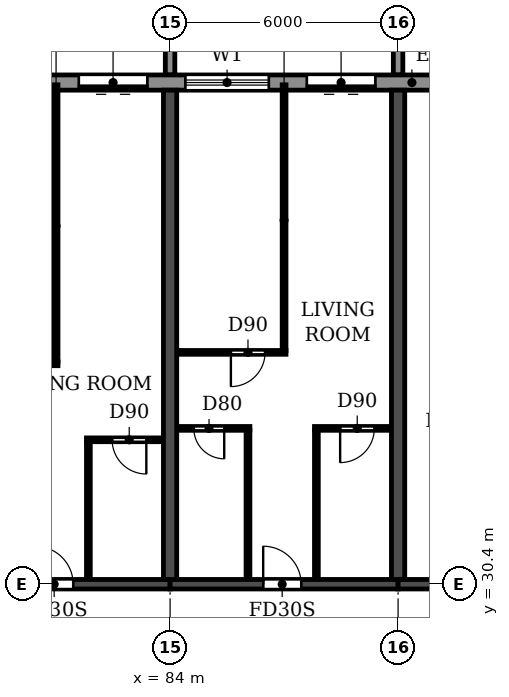
"""IFC4 building model, lengths in metres.
Left out: names, types, materials, properties, quantities, classifications, styles, units other than length and angle.
Written with IfcOpenShell. Run it as: python <this file> out.ifc"""

import sys

from ifc_helpers import new_model, si_unit, direction, frame, frame_2d, origin, place, context, subcontext, project, spatial, polyline, rectangle, outline, extrude, source, transform, mapped, element, fill, save


model = new_model("IFC4")
c1 = context("Model", 3, precision=1e-05, world=origin(), true_north=direction((0.0, 1.0)))
c2 = subcontext(c1, "Body", "Model", "MODEL_VIEW")
j1 = project(units=[si_unit("LENGTHUNIT", "METRE"), si_unit("PLANEANGLEUNIT", "RADIAN")], contexts=[c1])
p1 = place(None, origin())
s1 = spatial("IfcSite", under=j1, at=p1, CompositionType="ELEMENT")
p2 = place(p1, origin())
s2 = spatial("IfcBuilding", under=s1, at=p2, CompositionType="ELEMENT")
p3 = place(p2, frame((0.0, 0.0, 92.7)))
s3 = spatial("IfcBuildingStorey", under=s2, at=p3, CompositionType="ELEMENT", Elevation=92.7)
for number, where, z_axis, x_axis in (
    (1, (84.0, 30.525, 0.0), (0.0, 0.0, 1.0), (0.0, 1.0, 0.0)),
    (2, (90.0, 30.525, 0.0), (0.0, 0.0, 1.0), (0.0, 1.0, 0.0)),
):
    element("IfcWall", number, at=place(p3, frame(where, z_axis=z_axis, x_axis=x_axis)), inside=s3, PredefinedType="SHEAR", context=c2, shape_type="SweptSolid", body=[
        extrude(rectangle(XDim=12.875, YDim=0.35, at=frame_2d((6.438, 0.0))), origin(), (0.0, 0.0, 1.0), 3.06),
    ])
p4 = place(p3, frame((78.0, 30.4, 0.0), z_axis=(0.0, 0.0, 1.0), x_axis=(1.0, 0.0, 0.0)))
e3 = element("IfcWall", 3, at=p4, inside=s3, PredefinedType="SHEAR", context=c2, shape_type="SweptSolid", body=[
    extrude(rectangle(XDim=6.0, YDim=0.25, at=frame_2d((3.0, 0.0))), origin(), (0.0, 0.0, 1.0), 2.46),
])
p5 = place(p4, frame((2.45, 0.0, 0.0)))
e4 = element("IfcOpeningElement", 4, at=p5, cuts=e3, PredefinedType="OPENING", context=c2, shape_type="SweptSolid", body=[
    extrude(rectangle(XDim=1.0, YDim=2.1, at=frame_2d((0.5, 1.05))), frame((0.0, 0.135, 0.0), z_axis=(0.0, -1.0, 0.0), x_axis=(1.0, 0.0, 0.0)), (0.0, 0.0, 1.0), 0.27),
])
p6 = place(p3, frame((84.0, 30.4, 0.0), z_axis=(0.0, 0.0, 1.0), x_axis=(1.0, 0.0, 0.0)))
e5 = element("IfcWall", 5, at=p6, inside=s3, PredefinedType="SHEAR", context=c2, shape_type="SweptSolid", body=[
    extrude(rectangle(XDim=6.0, YDim=0.25, at=frame_2d((3.0, 0.0))), origin(), (0.0, 0.0, 1.0), 2.46),
])
p7 = place(p6, frame((2.45, 0.0, 0.0)))
e6 = element("IfcOpeningElement", 6, at=p7, cuts=e5, PredefinedType="OPENING", context=c2, shape_type="SweptSolid", body=[
    extrude(rectangle(XDim=1.0, YDim=2.1, at=frame_2d((0.5, 1.05))), frame((0.0, 0.135, 0.0), z_axis=(0.0, -1.0, 0.0), x_axis=(1.0, 0.0, 0.0)), (0.0, 0.0, 1.0), 0.27),
])
p8 = place(p3, frame((90.0, 30.4, 0.0), z_axis=(0.0, 0.0, 1.0), x_axis=(1.0, 0.0, 0.0)))
e7 = element("IfcWall", 7, at=p8, inside=s3, PredefinedType="SHEAR", context=c2, shape_type="SweptSolid", body=[
    extrude(rectangle(XDim=5.8, YDim=0.25, at=frame_2d((2.9, 0.0))), origin(), (0.0, 0.0, 1.0), 2.46),
])
p9 = place(p8, frame((2.5, 0.0, 0.0)))
e8 = element("IfcOpeningElement", 8, at=p9, cuts=e7, PredefinedType="OPENING", context=c2, shape_type="SweptSolid", body=[
    extrude(rectangle(XDim=1.0, YDim=2.1, at=frame_2d((0.5, 1.05))), frame((0.0, 0.135, 0.0), z_axis=(0.0, -1.0, 0.0), x_axis=(1.0, 0.0, 0.0)), (0.0, 0.0, 1.0), 0.27),
])
p10 = place(p3, frame((91.317, 43.6, 0.0), z_axis=(0.0, 0.0, 1.0), x_axis=(-1.0, 0.0, 0.0)))
e9 = element("IfcWall", 9, at=p10, inside=s3, PredefinedType="STANDARD", context=c2, shape_type="SweptSolid", body=[
    extrude(rectangle(XDim=80.634, YDim=0.4, at=frame_2d((40.317, 0.0))), origin(), (0.0, 0.0, 1.0), 3.06),
])
p11 = place(p10, frame((76.717, 0.0, 0.9)))
e10 = element("IfcOpeningElement", 10, at=p11, cuts=e9, PredefinedType="OPENING", context=c2, shape_type="SweptSolid", body=[
    extrude(rectangle(XDim=2.2, YDim=1.5, at=frame_2d((1.1, 0.75))), frame((0.0, 0.21, 0.0), z_axis=(0.0, -1.0, 0.0), x_axis=(1.0, 0.0, 0.0)), (0.0, 0.0, 1.0), 0.42),
])
p12 = place(p10, frame((73.917, 0.0, 0.0)))
e11 = element("IfcOpeningElement", 11, at=p12, cuts=e9, PredefinedType="OPENING", context=c2, shape_type="SweptSolid", body=[
    extrude(rectangle(XDim=1.8, YDim=2.4, at=frame_2d((0.9, 1.2))), frame((0.0, 0.21, 0.0), z_axis=(0.0, -1.0, 0.0), x_axis=(1.0, 0.0, 0.0)), (0.0, 0.0, 1.0), 0.42),
])
p13 = place(p10, frame((70.717, 0.0, 0.9)))
e12 = element("IfcOpeningElement", 12, at=p13, cuts=e9, PredefinedType="OPENING", context=c2, shape_type="SweptSolid", body=[
    extrude(rectangle(XDim=2.2, YDim=1.5, at=frame_2d((1.1, 0.75))), frame((0.0, 0.21, 0.0), z_axis=(0.0, -1.0, 0.0), x_axis=(1.0, 0.0, 0.0)), (0.0, 0.0, 1.0), 0.42),
])
p14 = place(p10, frame((67.717, 0.0, 0.9)))
e13 = element("IfcOpeningElement", 13, at=p14, cuts=e9, PredefinedType="OPENING", context=c2, shape_type="SweptSolid", body=[
    extrude(rectangle(XDim=2.2, YDim=1.5, at=frame_2d((1.1, 0.75))), frame((0.0, 0.21, 0.0), z_axis=(0.0, -1.0, 0.0), x_axis=(1.0, 0.0, 0.0)), (0.0, 0.0, 1.0), 0.42),
])
p15 = place(p10, frame((64.717, 0.0, 0.9)))
e14 = element("IfcOpeningElement", 14, at=p15, cuts=e9, PredefinedType="OPENING", context=c2, shape_type="SweptSolid", body=[
    extrude(rectangle(XDim=2.2, YDim=1.5, at=frame_2d((1.1, 0.75))), frame((0.0, 0.21, 0.0), z_axis=(0.0, -1.0, 0.0), x_axis=(1.0, 0.0, 0.0)), (0.0, 0.0, 1.0), 0.42),
])
p16 = place(p10, frame((61.917, 0.0, 0.0)))
e15 = element("IfcOpeningElement", 15, at=p16, cuts=e9, PredefinedType="OPENING", context=c2, shape_type="SweptSolid", body=[
    extrude(rectangle(XDim=1.8, YDim=2.4, at=frame_2d((0.9, 1.2))), frame((0.0, 0.21, 0.0), z_axis=(0.0, -1.0, 0.0), x_axis=(1.0, 0.0, 0.0)), (0.0, 0.0, 1.0), 0.42),
])
p17 = place(p10, frame((58.717, 0.0, 0.9)))
e16 = element("IfcOpeningElement", 16, at=p17, cuts=e9, PredefinedType="OPENING", context=c2, shape_type="SweptSolid", body=[
    extrude(rectangle(XDim=2.2, YDim=1.5, at=frame_2d((1.1, 0.75))), frame((0.0, 0.21, 0.0), z_axis=(0.0, -1.0, 0.0), x_axis=(1.0, 0.0, 0.0)), (0.0, 0.0, 1.0), 0.42),
])
p18 = place(p10, frame((55.717, 0.0, 0.9)))
e17 = element("IfcOpeningElement", 17, at=p18, cuts=e9, PredefinedType="OPENING", context=c2, shape_type="SweptSolid", body=[
    extrude(rectangle(XDim=2.2, YDim=1.5, at=frame_2d((1.1, 0.75))), frame((0.0, 0.21, 0.0), z_axis=(0.0, -1.0, 0.0), x_axis=(1.0, 0.0, 0.0)), (0.0, 0.0, 1.0), 0.42),
])
p19 = place(p10, frame((52.917, 0.0, 0.0)))
e18 = element("IfcOpeningElement", 18, at=p19, cuts=e9, PredefinedType="OPENING", context=c2, shape_type="SweptSolid", body=[
    extrude(rectangle(XDim=1.8, YDim=2.4, at=frame_2d((0.9, 1.2))), frame((0.0, 0.21, 0.0), z_axis=(0.0, -1.0, 0.0), x_axis=(1.0, 0.0, 0.0)), (0.0, 0.0, 1.0), 0.42),
])
p20 = place(p10, frame((49.717, 0.0, 0.9)))
e19 = element("IfcOpeningElement", 19, at=p20, cuts=e9, PredefinedType="OPENING", context=c2, shape_type="SweptSolid", body=[
    extrude(rectangle(XDim=2.2, YDim=1.5, at=frame_2d((1.1, 0.75))), frame((0.0, 0.21, 0.0), z_axis=(0.0, -1.0, 0.0), x_axis=(1.0, 0.0, 0.0)), (0.0, 0.0, 1.0), 0.42),
])
p21 = place(p10, frame((46.717, 0.0, 0.9)))
e20 = element("IfcOpeningElement", 20, at=p21, cuts=e9, PredefinedType="OPENING", context=c2, shape_type="SweptSolid", body=[
    extrude(rectangle(XDim=2.2, YDim=1.5, at=frame_2d((1.1, 0.75))), frame((0.0, 0.21, 0.0), z_axis=(0.0, -1.0, 0.0), x_axis=(1.0, 0.0, 0.0)), (0.0, 0.0, 1.0), 0.42),
])
p22 = place(p10, frame((43.717, 0.0, 0.9)))
e21 = element("IfcOpeningElement", 21, at=p22, cuts=e9, PredefinedType="OPENING", context=c2, shape_type="SweptSolid", body=[
    extrude(rectangle(XDim=2.2, YDim=1.5, at=frame_2d((1.1, 0.75))), frame((0.0, 0.21, 0.0), z_axis=(0.0, -1.0, 0.0), x_axis=(1.0, 0.0, 0.0)), (0.0, 0.0, 1.0), 0.42),
])
p23 = place(p10, frame((40.717, 0.0, 0.9)))
e22 = element("IfcOpeningElement", 22, at=p23, cuts=e9, PredefinedType="OPENING", context=c2, shape_type="SweptSolid", body=[
    extrude(rectangle(XDim=2.2, YDim=1.5, at=frame_2d((1.1, 0.75))), frame((0.0, 0.21, 0.0), z_axis=(0.0, -1.0, 0.0), x_axis=(1.0, 0.0, 0.0)), (0.0, 0.0, 1.0), 0.42),
])
p24 = place(p10, frame((37.917, 0.0, 0.0)))
e23 = element("IfcOpeningElement", 23, at=p24, cuts=e9, PredefinedType="OPENING", context=c2, shape_type="SweptSolid", body=[
    extrude(rectangle(XDim=1.8, YDim=2.4, at=frame_2d((0.9, 1.2))), frame((0.0, 0.21, 0.0), z_axis=(0.0, -1.0, 0.0), x_axis=(1.0, 0.0, 0.0)), (0.0, 0.0, 1.0), 0.42),
])
p25 = place(p10, frame((34.917, 0.0, 0.0)))
e24 = element("IfcOpeningElement", 24, at=p25, cuts=e9, PredefinedType="OPENING", context=c2, shape_type="SweptSolid", body=[
    extrude(rectangle(XDim=1.8, YDim=2.4, at=frame_2d((0.9, 1.2))), frame((0.0, 0.21, 0.0), z_axis=(0.0, -1.0, 0.0), x_axis=(1.0, 0.0, 0.0)), (0.0, 0.0, 1.0), 0.42),
])
p26 = place(p10, frame((31.717, 0.0, 0.9)))
e25 = element("IfcOpeningElement", 25, at=p26, cuts=e9, PredefinedType="OPENING", context=c2, shape_type="SweptSolid", body=[
    extrude(rectangle(XDim=2.2, YDim=1.5, at=frame_2d((1.1, 0.75))), frame((0.0, 0.21, 0.0), z_axis=(0.0, -1.0, 0.0), x_axis=(1.0, 0.0, 0.0)), (0.0, 0.0, 1.0), 0.42),
])
p27 = place(p10, frame((28.717, 0.0, 0.9)))
e26 = element("IfcOpeningElement", 26, at=p27, cuts=e9, PredefinedType="OPENING", context=c2, shape_type="SweptSolid", body=[
    extrude(rectangle(XDim=2.2, YDim=1.5, at=frame_2d((1.1, 0.75))), frame((0.0, 0.21, 0.0), z_axis=(0.0, -1.0, 0.0), x_axis=(1.0, 0.0, 0.0)), (0.0, 0.0, 1.0), 0.42),
])
p28 = place(p10, frame((25.717, 0.0, 0.9)))
e27 = element("IfcOpeningElement", 27, at=p28, cuts=e9, PredefinedType="OPENING", context=c2, shape_type="SweptSolid", body=[
    extrude(rectangle(XDim=2.2, YDim=1.5, at=frame_2d((1.1, 0.75))), frame((0.0, 0.21, 0.0), z_axis=(0.0, -1.0, 0.0), x_axis=(1.0, 0.0, 0.0)), (0.0, 0.0, 1.0), 0.42),
])
p29 = place(p10, frame((22.717, 0.0, 0.9)))
e28 = element("IfcOpeningElement", 28, at=p29, cuts=e9, PredefinedType="OPENING", context=c2, shape_type="SweptSolid", body=[
    extrude(rectangle(XDim=2.2, YDim=1.5, at=frame_2d((1.1, 0.75))), frame((0.0, 0.21, 0.0), z_axis=(0.0, -1.0, 0.0), x_axis=(1.0, 0.0, 0.0)), (0.0, 0.0, 1.0), 0.42),
])
p30 = place(p10, frame((19.917, 0.0, 0.0)))
e29 = element("IfcOpeningElement", 29, at=p30, cuts=e9, PredefinedType="OPENING", context=c2, shape_type="SweptSolid", body=[
    extrude(rectangle(XDim=1.8, YDim=2.4, at=frame_2d((0.9, 1.2))), frame((0.0, 0.21, 0.0), z_axis=(0.0, -1.0, 0.0), x_axis=(1.0, 0.0, 0.0)), (0.0, 0.0, 1.0), 0.42),
])
p31 = place(p10, frame((16.717, 0.0, 0.9)))
e30 = element("IfcOpeningElement", 30, at=p31, cuts=e9, PredefinedType="OPENING", context=c2, shape_type="SweptSolid", body=[
    extrude(rectangle(XDim=2.2, YDim=1.5, at=frame_2d((1.1, 0.75))), frame((0.0, 0.21, 0.0), z_axis=(0.0, -1.0, 0.0), x_axis=(1.0, 0.0, 0.0)), (0.0, 0.0, 1.0), 0.42),
])
p32 = place(p10, frame((13.917, 0.0, 0.0)))
e31 = element("IfcOpeningElement", 31, at=p32, cuts=e9, PredefinedType="OPENING", context=c2, shape_type="SweptSolid", body=[
    extrude(rectangle(XDim=1.8, YDim=2.4, at=frame_2d((0.9, 1.2))), frame((0.0, 0.21, 0.0), z_axis=(0.0, -1.0, 0.0), x_axis=(1.0, 0.0, 0.0)), (0.0, 0.0, 1.0), 0.42),
])
p33 = place(p10, frame((10.717, 0.0, 0.9)))
e32 = element("IfcOpeningElement", 32, at=p33, cuts=e9, PredefinedType="OPENING", context=c2, shape_type="SweptSolid", body=[
    extrude(rectangle(XDim=2.2, YDim=1.5, at=frame_2d((1.1, 0.75))), frame((0.0, 0.21, 0.0), z_axis=(0.0, -1.0, 0.0), x_axis=(1.0, 0.0, 0.0)), (0.0, 0.0, 1.0), 0.42),
])
p34 = place(p10, frame((7.917, 0.0, 0.0)))
e33 = element("IfcOpeningElement", 33, at=p34, cuts=e9, PredefinedType="OPENING", context=c2, shape_type="SweptSolid", body=[
    extrude(rectangle(XDim=1.8, YDim=2.4, at=frame_2d((0.9, 1.2))), frame((0.0, 0.21, 0.0), z_axis=(0.0, -1.0, 0.0), x_axis=(1.0, 0.0, 0.0)), (0.0, 0.0, 1.0), 0.42),
])
p35 = place(p10, frame((4.717, 0.0, 0.9)))
e34 = element("IfcOpeningElement", 34, at=p35, cuts=e9, PredefinedType="OPENING", context=c2, shape_type="SweptSolid", body=[
    extrude(rectangle(XDim=2.2, YDim=1.5, at=frame_2d((1.1, 0.75))), frame((0.0, 0.21, 0.0), z_axis=(0.0, -1.0, 0.0), x_axis=(1.0, 0.0, 0.0)), (0.0, 0.0, 1.0), 0.42),
])
p36 = place(p10, frame((1.917, 0.0, 0.0)))
e35 = element("IfcOpeningElement", 35, at=p36, cuts=e9, PredefinedType="OPENING", context=c2, shape_type="SweptSolid", body=[
    extrude(rectangle(XDim=1.8, YDim=2.4, at=frame_2d((0.9, 1.2))), frame((0.0, 0.21, 0.0), z_axis=(0.0, -1.0, 0.0), x_axis=(1.0, 0.0, 0.0)), (0.0, 0.0, 1.0), 0.42),
])
m1 = source(origin(), c2, "Body", "SweptSolid", [
    extrude(outline(polyline([(0.0, 0.0), (0.25, 0.0), (0.25, 3.1), (0.0, 3.1), (0.0, 0.0)])), origin(), (0.0, 0.0, 1.0), 3.1),
])
for number, where in (
    (36, (83.875, 43.8, 0.0)),
    (37, (89.875, 43.8, 0.0)),
):
    element("IfcWall", number, at=place(p3, frame(where)), inside=s3, PredefinedType="STANDARD", context=c2, shape_type="MappedRepresentation", body=[
        mapped(m1, transform((0.0, 0.0, 0.0))),
    ])
p37 = place(p3, frame((81.8, 34.2, 0.0), z_axis=(0.0, 0.0, 1.0), x_axis=(1.0, 0.0, 0.0)))
e38 = element("IfcWall", 38, at=p37, inside=s3, PredefinedType="PARTITIONING", context=c2, shape_type="SweptSolid", body=[
    extrude(rectangle(XDim=2.015, YDim=0.1, at=frame_2d((1.007, 0.0))), origin(), (0.0, 0.0, 1.0), 3.06),
])
p38 = place(p37, frame((0.675, 0.0, 0.0)))
e39 = element("IfcOpeningElement", 39, at=p38, cuts=e38, PredefinedType="OPENING", context=c2, shape_type="SweptSolid", body=[
    extrude(rectangle(XDim=0.9, YDim=2.1, at=frame_2d((0.45, 1.05))), frame((0.0, 0.06, 0.0), z_axis=(0.0, -1.0, 0.0), x_axis=(1.0, 0.0, 0.0)), (0.0, 0.0, 1.0), 0.12),
])
p39 = place(p3, frame((84.185, 34.5, 0.0), z_axis=(0.0, 0.0, 1.0), x_axis=(1.0, 0.0, 0.0)))
e40 = element("IfcWall", 40, at=p39, inside=s3, PredefinedType="PARTITIONING", context=c2, shape_type="SweptSolid", body=[
    extrude(rectangle(XDim=1.915, YDim=0.1, at=frame_2d((0.958, 0.0))), origin(), (0.0, 0.0, 1.0), 3.06),
])
p40 = place(p39, frame((0.44, 0.0, 0.0)))
e41 = element("IfcOpeningElement", 41, at=p40, cuts=e40, PredefinedType="OPENING", context=c2, shape_type="SweptSolid", body=[
    extrude(rectangle(XDim=0.8, YDim=2.1, at=frame_2d((0.4, 1.05))), frame((0.0, 0.06, 0.0), z_axis=(0.0, -1.0, 0.0), x_axis=(1.0, 0.0, 0.0)), (0.0, 0.0, 1.0), 0.12),
])
p41 = place(p3, frame((87.8, 34.5, 0.0), z_axis=(0.0, 0.0, 1.0), x_axis=(1.0, 0.0, 0.0)))
e42 = element("IfcWall", 42, at=p41, inside=s3, PredefinedType="PARTITIONING", context=c2, shape_type="SweptSolid", body=[
    extrude(rectangle(XDim=2.015, YDim=0.1, at=frame_2d((1.007, 0.0))), origin(), (0.0, 0.0, 1.0), 3.06),
])
p42 = place(p41, frame((0.675, 0.0, 0.0)))
e43 = element("IfcOpeningElement", 43, at=p42, cuts=e42, PredefinedType="OPENING", context=c2, shape_type="SweptSolid", body=[
    extrude(rectangle(XDim=0.9, YDim=2.1, at=frame_2d((0.45, 1.05))), frame((0.0, 0.06, 0.0), z_axis=(0.0, -1.0, 0.0), x_axis=(1.0, 0.0, 0.0)), (0.0, 0.0, 1.0), 0.12),
])
p43 = place(p3, frame((78.185, 36.2, 0.0), z_axis=(0.0, 0.0, 1.0), x_axis=(1.0, 0.0, 0.0)))
e44 = element("IfcWall", 44, at=p43, inside=s3, PredefinedType="PARTITIONING", context=c2, shape_type="SweptSolid", body=[
    extrude(rectangle(XDim=2.865, YDim=0.1, at=frame_2d((1.433, 0.0))), origin(), (0.0, 0.0, 1.0), 3.06),
])
p44 = place(p43, frame((0.315, 0.0, 0.0)))
e45 = element("IfcOpeningElement", 45, at=p44, cuts=e44, PredefinedType="OPENING", context=c2, shape_type="SweptSolid", body=[
    extrude(rectangle(XDim=0.9, YDim=2.1, at=frame_2d((0.45, 1.05))), frame((0.0, 0.06, 0.0), z_axis=(0.0, -1.0, 0.0), x_axis=(1.0, 0.0, 0.0)), (0.0, 0.0, 1.0), 0.12),
])
p45 = place(p3, frame((84.185, 36.5, 0.0), z_axis=(0.0, 0.0, 1.0), x_axis=(1.0, 0.0, 0.0)))
e46 = element("IfcWall", 46, at=p45, inside=s3, PredefinedType="PARTITIONING", context=c2, shape_type="SweptSolid", body=[
    extrude(rectangle(XDim=2.865, YDim=0.1, at=frame_2d((1.433, 0.0))), origin(), (0.0, 0.0, 1.0), 3.06),
])
p46 = place(p45, frame((1.415, 0.0, 0.0)))
e47 = element("IfcOpeningElement", 47, at=p46, cuts=e46, PredefinedType="OPENING", context=c2, shape_type="SweptSolid", body=[
    extrude(rectangle(XDim=0.9, YDim=2.1, at=frame_2d((0.45, 1.05))), frame((0.0, 0.06, 0.0), z_axis=(0.0, -1.0, 0.0), x_axis=(1.0, 0.0, 0.0)), (0.0, 0.0, 1.0), 0.12),
])
p47 = place(p3, frame((81.0, 36.25, 0.0), z_axis=(0.0, 0.0, 1.0), x_axis=(0.0, 1.0, 0.0)))
e48 = element("IfcWall", 48, at=p47, inside=s3, PredefinedType="PARTITIONING", context=c2, shape_type="SweptSolid", body=[
    extrude(rectangle(XDim=7.29, YDim=0.1, at=frame_2d((3.645, 0.0))), origin(), (0.0, 0.0, 1.0), 3.06),
])
p48 = place(p3, frame((81.85, 30.535, 0.0), z_axis=(0.0, 0.0, 1.0), x_axis=(0.0, 1.0, 0.0)))
e49 = element("IfcWall", 49, at=p48, inside=s3, PredefinedType="PARTITIONING", context=c2, shape_type="SweptSolid", body=[
    extrude(rectangle(XDim=3.615, YDim=0.1, at=frame_2d((1.808, 0.0))), origin(), (0.0, 0.0, 1.0), 3.06),
])
p49 = place(p3, frame((86.05, 30.535, 0.0), z_axis=(0.0, 0.0, 1.0), x_axis=(0.0, 1.0, 0.0)))
e50 = element("IfcWall", 50, at=p49, inside=s3, PredefinedType="PARTITIONING", context=c2, shape_type="SweptSolid", body=[
    extrude(rectangle(XDim=3.915, YDim=0.1, at=frame_2d((1.958, 0.0))), origin(), (0.0, 0.0, 1.0), 3.06),
])
p50 = place(p3, frame((87.0, 36.55, 0.0), z_axis=(0.0, 0.0, 1.0), x_axis=(0.0, 1.0, 0.0)))
e51 = element("IfcWall", 51, at=p50, inside=s3, PredefinedType="PARTITIONING", context=c2, shape_type="SweptSolid", body=[
    extrude(rectangle(XDim=6.99, YDim=0.1, at=frame_2d((3.495, 0.0))), origin(), (0.0, 0.0, 1.0), 3.06),
])
p51 = place(p3, frame((87.85, 30.535, 0.0), z_axis=(0.0, 0.0, 1.0), x_axis=(0.0, 1.0, 0.0)))
e52 = element("IfcWall", 52, at=p51, inside=s3, PredefinedType="PARTITIONING", context=c2, shape_type="SweptSolid", body=[
    extrude(rectangle(XDim=3.915, YDim=0.1, at=frame_2d((1.958, 0.0))), origin(), (0.0, 0.0, 1.0), 3.06),
])
p52 = place(p34, origin())
e53 = element("IfcDoor", 53, at=p52, inside=s3, OperationType="DOUBLE_DOOR_SLIDING", PredefinedType="DOOR", context=c2, shape_type="SweptSolid", body=[
    extrude(rectangle(XDim=1.8, YDim=2.4, at=frame_2d((0.9, 1.2))), frame((0.0, 0.025, 0.0), z_axis=(0.0, -1.0, 0.0), x_axis=(1.0, 0.0, 0.0)), (0.0, 0.0, 1.0), 0.05),
])
fill(e33, e53)
p53 = place(p35, origin())
e54 = element("IfcWindow", 54, at=p53, inside=s3, PartitioningType="DOUBLE_PANEL_HORIZONTAL", PredefinedType="WINDOW", context=c2, shape_type="SweptSolid", body=[
    extrude(rectangle(XDim=2.2, YDim=1.5, at=frame_2d((1.1, 0.75))), frame((0.0, 0.03, 0.0), z_axis=(0.0, -1.0, 0.0), x_axis=(1.0, 0.0, 0.0)), (0.0, 0.0, 1.0), 0.06),
])
fill(e34, e54)
p54 = place(p36, origin())
e55 = element("IfcDoor", 55, at=p54, inside=s3, OperationType="DOUBLE_DOOR_SLIDING", PredefinedType="DOOR", context=c2, shape_type="SweptSolid", body=[
    extrude(rectangle(XDim=1.8, YDim=2.4, at=frame_2d((0.9, 1.2))), frame((0.0, 0.025, 0.0), z_axis=(0.0, -1.0, 0.0), x_axis=(1.0, 0.0, 0.0)), (0.0, 0.0, 1.0), 0.05),
])
fill(e35, e55)
p55 = place(p5, origin())
e56 = element("IfcDoor", 56, at=p55, inside=s3, OperationType="SINGLE_SWING_LEFT", PredefinedType="DOOR", context=c2, shape_type="SweptSolid", body=[
    extrude(rectangle(XDim=1.0, YDim=2.1, at=frame_2d((0.5, 1.05))), frame((0.0, 0.025, 0.0), z_axis=(0.0, -1.0, 0.0), x_axis=(1.0, 0.0, 0.0)), (0.0, 0.0, 1.0), 0.05),
])
fill(e4, e56)
p56 = place(p38, frame((0.9, 0.0, 0.0), z_axis=(0.0, 0.0, 1.0), x_axis=(-1.0, 0.0, 0.0)))
e57 = element("IfcDoor", 57, at=p56, inside=s3, OperationType="SINGLE_SWING_LEFT", PredefinedType="DOOR", context=c2, shape_type="SweptSolid", body=[
    extrude(rectangle(XDim=0.9, YDim=2.1, at=frame_2d((0.45, 1.05))), frame((0.0, 0.025, 0.0), z_axis=(0.0, -1.0, 0.0), x_axis=(1.0, 0.0, 0.0)), (0.0, 0.0, 1.0), 0.05),
])
fill(e39, e57)
p57 = place(p40, frame((0.8, 0.0, 0.0), z_axis=(0.0, 0.0, 1.0), x_axis=(-1.0, 0.0, 0.0)))
e58 = element("IfcDoor", 58, at=p57, inside=s3, OperationType="SINGLE_SWING_LEFT", PredefinedType="DOOR", context=c2, shape_type="SweptSolid", body=[
    extrude(rectangle(XDim=0.8, YDim=2.1, at=frame_2d((0.4, 1.05))), frame((0.0, 0.025, 0.0), z_axis=(0.0, -1.0, 0.0), x_axis=(1.0, 0.0, 0.0)), (0.0, 0.0, 1.0), 0.05),
])
fill(e41, e58)
p58 = place(p46, frame((0.9, 0.0, 0.0), z_axis=(0.0, 0.0, 1.0), x_axis=(-1.0, 0.0, 0.0)))
e59 = element("IfcDoor", 59, at=p58, inside=s3, OperationType="SINGLE_SWING_RIGHT", PredefinedType="DOOR", context=c2, shape_type="SweptSolid", body=[
    extrude(rectangle(XDim=0.9, YDim=2.1, at=frame_2d((0.45, 1.05))), frame((0.0, 0.025, 0.0), z_axis=(0.0, -1.0, 0.0), x_axis=(1.0, 0.0, 0.0)), (0.0, 0.0, 1.0), 0.05),
])
fill(e47, e59)
p59 = place(p7, origin())
e60 = element("IfcDoor", 60, at=p59, inside=s3, OperationType="SINGLE_SWING_LEFT", PredefinedType="DOOR", context=c2, shape_type="SweptSolid", body=[
    extrude(rectangle(XDim=1.0, YDim=2.1, at=frame_2d((0.5, 1.05))), frame((0.0, 0.025, 0.0), z_axis=(0.0, -1.0, 0.0), x_axis=(1.0, 0.0, 0.0)), (0.0, 0.0, 1.0), 0.05),
])
fill(e6, e60)
p60 = place(p42, frame((0.9, 0.0, 0.0), z_axis=(0.0, 0.0, 1.0), x_axis=(-1.0, 0.0, 0.0)))
e61 = element("IfcDoor", 61, at=p60, inside=s3, OperationType="SINGLE_SWING_RIGHT", PredefinedType="DOOR", context=c2, shape_type="SweptSolid", body=[
    extrude(rectangle(XDim=0.9, YDim=2.1, at=frame_2d((0.45, 1.05))), frame((0.0, 0.025, 0.0), z_axis=(0.0, -1.0, 0.0), x_axis=(1.0, 0.0, 0.0)), (0.0, 0.0, 1.0), 0.05),
])
fill(e43, e61)
save(model, sys.argv[1])
